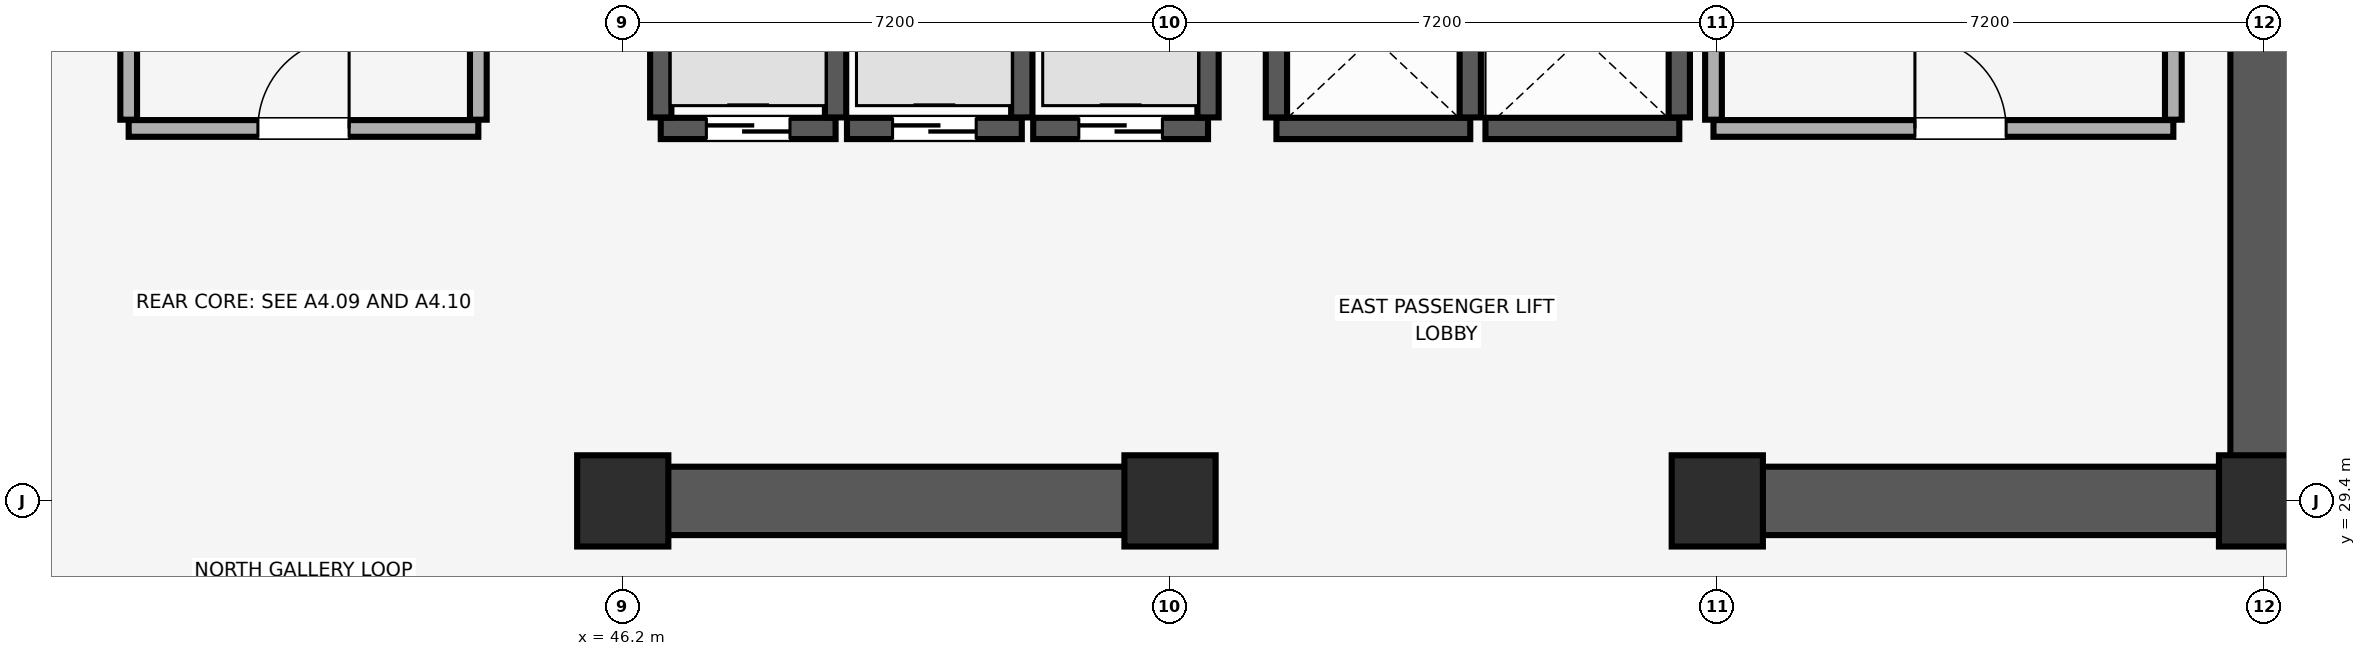
"""IFC4 building model, lengths in metres.
Left out: names, types, materials, properties, quantities, classifications, styles, units other than length and angle.
Written with IfcOpenShell. Run it as: python <this file> out.ifc"""

import sys

from ifc_helpers import new_model, si_unit, direction, frame, frame_2d, origin, origin_2d, place, context, subcontext, project, spatial, rectangle, extrude, element, fill, save


model = new_model("IFC4")
c1 = context("Model", 3, precision=1e-05, world=origin(), true_north=direction((0.0, 1.0)))
c2 = subcontext(c1, "Body", "Model", "MODEL_VIEW")
j1 = project(units=[si_unit("LENGTHUNIT", "METRE"), si_unit("PLANEANGLEUNIT", "RADIAN")], contexts=[c1])
p1 = place(None, origin())
s1 = spatial("IfcSite", under=j1, at=p1, CompositionType="ELEMENT")
p2 = place(p1, origin())
s2 = spatial("IfcBuilding", under=s1, at=p2, CompositionType="ELEMENT")
p3 = place(p2, frame((0.0, 0.0, 180.95)))
s3 = spatial("IfcBuildingStorey", under=s2, at=p3, CompositionType="ELEMENT", Elevation=180.95)
for number, where, z_axis, x_axis in (
    (1, (46.2, 29.4, 0.0), (0.0, 0.0, 1.0), (1.0, 0.0, 0.0)),
    (2, (53.4, 29.4, 0.0), (0.0, 0.0, 1.0), (1.0, 0.0, 0.0)),
    (3, (60.6, 29.4, 0.0), (0.0, 0.0, 1.0), (1.0, 0.0, 0.0)),
    (4, (67.8, 29.4, 0.0), (0.0, 0.0, 1.0), (1.0, 0.0, 0.0)),
):
    element("IfcColumn", number, at=place(p3, frame(where, z_axis=z_axis, x_axis=x_axis)), inside=s3, PredefinedType="COLUMN", context=c2, shape_type="SweptSolid", body=[
        extrude(rectangle(XDim=1.2, YDim=1.2, at=origin_2d()), origin(), (0.0, 0.0, 1.0), 3.45),
    ])
p4 = place(p3, frame((67.8, 29.4, 0.0), z_axis=(0.0, 0.0, 1.0), x_axis=(0.0, 1.0, 0.0)))
e5 = element("IfcWall", 5, at=p4, inside=s3, PredefinedType="SHEAR", context=c2, shape_type="SweptSolid", body=[
    extrude(rectangle(XDim=19.2, YDim=0.9, at=frame_2d((9.6, 0.0))), origin(), (0.0, 0.0, 1.0), 3.45),
])
p5 = place(p3, frame((46.0, 29.4, 0.0), z_axis=(0.0, 0.0, 1.0), x_axis=(1.0, 0.0, 0.0)))
e6 = element("IfcWall", 6, at=p5, inside=s3, PredefinedType="SHEAR", context=c2, shape_type="SweptSolid", body=[
    extrude(rectangle(XDim=7.6, YDim=0.9, at=frame_2d((3.8, 0.0))), origin(), (0.0, 0.0, 1.0), 3.45),
])
p6 = place(p3, frame((60.4, 29.4, 0.0), z_axis=(0.0, 0.0, 1.0), x_axis=(1.0, 0.0, 0.0)))
e7 = element("IfcWall", 7, at=p6, inside=s3, PredefinedType="SHEAR", context=c2, shape_type="SweptSolid", body=[
    extrude(rectangle(XDim=6.945, YDim=0.9, at=frame_2d((3.473, 0.0))), origin(), (0.0, 0.0, 1.0), 3.45),
])
p7 = place(p3, frame((46.7, 34.3, 0.0), z_axis=(0.0, 0.0, 1.0), x_axis=(1.0, 0.0, 0.0)))
e8 = element("IfcWall", 8, at=p7, inside=s3, PredefinedType="SHEAR", context=c2, shape_type="SweptSolid", body=[
    extrude(rectangle(XDim=2.3, YDim=0.28, at=frame_2d((1.15, 0.0))), origin(), (0.0, 0.0, 1.0), 3.45),
])
p8 = place(p7, frame((0.6, 0.0, 0.0)))
e9 = element("IfcOpeningElement", 9, at=p8, cuts=e8, PredefinedType="OPENING", context=c2, shape_type="SweptSolid", body=[
    extrude(rectangle(XDim=1.1, YDim=2.2, at=frame_2d((0.55, 1.1))), frame((0.0, 0.15, 0.0), z_axis=(0.0, -1.0, 0.0), x_axis=(1.0, 0.0, 0.0)), (0.0, 0.0, 1.0), 0.3),
])
for number, where, z_axis, x_axis in (
    (10, (46.7, 34.445, 0.0), (0.0, 0.0, 1.0), (0.0, 1.0, 0.0)),
    (11, (49.0, 34.445, 0.0), (0.0, 0.0, 1.0), (0.0, 1.0, 0.0)),
):
    element("IfcWall", number, at=place(p3, frame(where, z_axis=z_axis, x_axis=x_axis)), inside=s3, PredefinedType="SHEAR", context=c2, shape_type="SweptSolid", body=[
        extrude(rectangle(XDim=2.01, YDim=0.28, at=frame_2d((1.005, 0.0))), origin(), (0.0, 0.0, 1.0), 3.45),
    ])
p9 = place(p3, frame((49.15, 34.3, 0.0), z_axis=(0.0, 0.0, 1.0), x_axis=(1.0, 0.0, 0.0)))
e12 = element("IfcWall", 12, at=p9, inside=s3, PredefinedType="SHEAR", context=c2, shape_type="SweptSolid", body=[
    extrude(rectangle(XDim=2.3, YDim=0.28, at=frame_2d((1.15, 0.0))), origin(), (0.0, 0.0, 1.0), 3.45),
])
p10 = place(p9, frame((0.6, 0.0, 0.0)))
e13 = element("IfcOpeningElement", 13, at=p10, cuts=e12, PredefinedType="OPENING", context=c2, shape_type="SweptSolid", body=[
    extrude(rectangle(XDim=1.1, YDim=2.2, at=frame_2d((0.55, 1.1))), frame((0.0, 0.15, 0.0), z_axis=(0.0, -1.0, 0.0), x_axis=(1.0, 0.0, 0.0)), (0.0, 0.0, 1.0), 0.3),
])
p11 = place(p3, frame((51.45, 34.445, 0.0), z_axis=(0.0, 0.0, 1.0), x_axis=(0.0, 1.0, 0.0)))
e14 = element("IfcWall", 14, at=p11, inside=s3, PredefinedType="SHEAR", context=c2, shape_type="SweptSolid", body=[
    extrude(rectangle(XDim=2.01, YDim=0.28, at=frame_2d((1.005, 0.0))), origin(), (0.0, 0.0, 1.0), 3.45),
])
p12 = place(p3, frame((51.6, 34.3, 0.0), z_axis=(0.0, 0.0, 1.0), x_axis=(1.0, 0.0, 0.0)))
e15 = element("IfcWall", 15, at=p12, inside=s3, PredefinedType="SHEAR", context=c2, shape_type="SweptSolid", body=[
    extrude(rectangle(XDim=2.3, YDim=0.28, at=frame_2d((1.15, 0.0))), origin(), (0.0, 0.0, 1.0), 3.45),
])
p13 = place(p12, frame((0.6, 0.0, 0.0)))
e16 = element("IfcOpeningElement", 16, at=p13, cuts=e15, PredefinedType="OPENING", context=c2, shape_type="SweptSolid", body=[
    extrude(rectangle(XDim=1.1, YDim=2.2, at=frame_2d((0.55, 1.1))), frame((0.0, 0.15, 0.0), z_axis=(0.0, -1.0, 0.0), x_axis=(1.0, 0.0, 0.0)), (0.0, 0.0, 1.0), 0.3),
])
p14 = place(p3, frame((53.9, 34.445, 0.0), z_axis=(0.0, 0.0, 1.0), x_axis=(0.0, 1.0, 0.0)))
e17 = element("IfcWall", 17, at=p14, inside=s3, PredefinedType="SHEAR", context=c2, shape_type="SweptSolid", body=[
    extrude(rectangle(XDim=2.01, YDim=0.28, at=frame_2d((1.005, 0.0))), origin(), (0.0, 0.0, 1.0), 3.45),
])
p15 = place(p3, frame((54.8, 34.3, 0.0), z_axis=(0.0, 0.0, 1.0), x_axis=(1.0, 0.0, 0.0)))
e18 = element("IfcWall", 18, at=p15, inside=s3, PredefinedType="SHEAR", context=c2, shape_type="SweptSolid", body=[
    extrude(rectangle(XDim=2.55, YDim=0.28, at=frame_2d((1.275, 0.0))), origin(), (0.0, 0.0, 1.0), 3.45),
])
for number, where, z_axis, x_axis in (
    (19, (54.8, 34.445, 0.0), (0.0, 0.0, 1.0), (0.0, 1.0, 0.0)),
    (20, (57.35, 34.445, 0.0), (0.0, 0.0, 1.0), (0.0, 1.0, 0.0)),
):
    element("IfcWall", number, at=place(p3, frame(where, z_axis=z_axis, x_axis=x_axis)), inside=s3, PredefinedType="SHEAR", context=c2, shape_type="SweptSolid", body=[
        extrude(rectangle(XDim=2.11, YDim=0.28, at=frame_2d((1.055, 0.0))), origin(), (0.0, 0.0, 1.0), 3.45),
    ])
p16 = place(p3, frame((57.55, 34.3, 0.0), z_axis=(0.0, 0.0, 1.0), x_axis=(1.0, 0.0, 0.0)))
e21 = element("IfcWall", 21, at=p16, inside=s3, PredefinedType="SHEAR", context=c2, shape_type="SweptSolid", body=[
    extrude(rectangle(XDim=2.55, YDim=0.28, at=frame_2d((1.275, 0.0))), origin(), (0.0, 0.0, 1.0), 3.45),
])
p17 = place(p3, frame((60.1, 34.445, 0.0), z_axis=(0.0, 0.0, 1.0), x_axis=(0.0, 1.0, 0.0)))
e22 = element("IfcWall", 22, at=p17, inside=s3, PredefinedType="SHEAR", context=c2, shape_type="SweptSolid", body=[
    extrude(rectangle(XDim=2.11, YDim=0.28, at=frame_2d((1.055, 0.0))), origin(), (0.0, 0.0, 1.0), 3.45),
])
p18 = place(p3, frame((60.55, 34.3, 0.0), z_axis=(0.0, 0.0, 1.0), x_axis=(1.0, 0.0, 0.0)))
e23 = element("IfcWall", 23, at=p18, inside=s3, PredefinedType="PARTITIONING", context=c2, shape_type="SweptSolid", body=[
    extrude(rectangle(XDim=6.05, YDim=0.22, at=frame_2d((3.025, 0.0))), origin(), (0.0, 0.0, 1.0), 3.45),
])
p19 = place(p18, frame((2.65, 0.0, 0.0)))
e24 = element("IfcOpeningElement", 24, at=p19, cuts=e23, PredefinedType="OPENING", context=c2, shape_type="SweptSolid", body=[
    extrude(rectangle(XDim=1.2, YDim=2.15, at=frame_2d((0.6, 1.075))), frame((0.0, 0.12, 0.0), z_axis=(0.0, -1.0, 0.0), x_axis=(1.0, 0.0, 0.0)), (0.0, 0.0, 1.0), 0.24),
])
p20 = place(p3, frame((60.55, 34.415, 0.0), z_axis=(0.0, 0.0, 1.0), x_axis=(0.0, 1.0, 0.0)))
e25 = element("IfcWall", 25, at=p20, inside=s3, PredefinedType="PARTITIONING", context=c2, shape_type="SweptSolid", body=[
    extrude(rectangle(XDim=5.64, YDim=0.22, at=frame_2d((2.82, 0.0))), origin(), (0.0, 0.0, 1.0), 3.45),
])
p21 = place(p3, frame((66.6, 34.415, 0.0), z_axis=(0.0, 0.0, 1.0), x_axis=(0.0, 1.0, 0.0)))
e26 = element("IfcWall", 26, at=p21, inside=s3, PredefinedType="PARTITIONING", context=c2, shape_type="SweptSolid", body=[
    extrude(rectangle(XDim=5.43, YDim=0.22, at=frame_2d((2.715, 0.0))), origin(), (0.0, 0.0, 1.0), 3.45),
])
p22 = place(p3, frame((39.7, 34.3, 0.0), z_axis=(0.0, 0.0, 1.0), x_axis=(1.0, 0.0, 0.0)))
e27 = element("IfcWall", 27, at=p22, inside=s3, PredefinedType="PARTITIONING", context=c2, shape_type="SweptSolid", body=[
    extrude(rectangle(XDim=4.6, YDim=0.22, at=frame_2d((2.3, 0.0))), origin(), (0.0, 0.0, 1.0), 3.45),
])
p23 = place(p22, frame((1.7, 0.0, 0.0)))
e28 = element("IfcOpeningElement", 28, at=p23, cuts=e27, PredefinedType="OPENING", context=c2, shape_type="SweptSolid", body=[
    extrude(rectangle(XDim=1.2, YDim=2.15, at=frame_2d((0.6, 1.075))), frame((0.0, 0.12, 0.0), z_axis=(0.0, -1.0, 0.0), x_axis=(1.0, 0.0, 0.0)), (0.0, 0.0, 1.0), 0.24),
])
for number, where, z_axis, x_axis in (
    (29, (39.7, 34.415, 0.0), (0.0, 0.0, 1.0), (0.0, 1.0, 0.0)),
    (30, (44.3, 34.415, 0.0), (0.0, 0.0, 1.0), (0.0, 1.0, 0.0)),
):
    element("IfcWall", number, at=place(p3, frame(where, z_axis=z_axis, x_axis=x_axis)), inside=s3, PredefinedType="PARTITIONING", context=c2, shape_type="SweptSolid", body=[
        extrude(rectangle(XDim=5.785, YDim=0.22, at=frame_2d((2.893, 0.0))), origin(), (0.0, 0.0, 1.0), 3.45),
    ])
p24 = place(p8, origin())
e31 = element("IfcDoor", 31, at=p24, inside=s3, OperationType="DOUBLE_DOOR_SLIDING", PredefinedType="DOOR", context=c2, shape_type="SweptSolid", body=[
    extrude(rectangle(XDim=1.1, YDim=2.2, at=frame_2d((0.55, 1.1))), frame((0.0, 0.025, 0.0), z_axis=(0.0, -1.0, 0.0), x_axis=(1.0, 0.0, 0.0)), (0.0, 0.0, 1.0), 0.05),
])
fill(e9, e31)
p25 = place(p10, origin())
e32 = element("IfcDoor", 32, at=p25, inside=s3, OperationType="DOUBLE_DOOR_SLIDING", PredefinedType="DOOR", context=c2, shape_type="SweptSolid", body=[
    extrude(rectangle(XDim=1.1, YDim=2.2, at=frame_2d((0.55, 1.1))), frame((0.0, 0.025, 0.0), z_axis=(0.0, -1.0, 0.0), x_axis=(1.0, 0.0, 0.0)), (0.0, 0.0, 1.0), 0.05),
])
fill(e13, e32)
p26 = place(p13, origin())
e33 = element("IfcDoor", 33, at=p26, inside=s3, OperationType="DOUBLE_DOOR_SLIDING", PredefinedType="DOOR", context=c2, shape_type="SweptSolid", body=[
    extrude(rectangle(XDim=1.1, YDim=2.2, at=frame_2d((0.55, 1.1))), frame((0.0, 0.025, 0.0), z_axis=(0.0, -1.0, 0.0), x_axis=(1.0, 0.0, 0.0)), (0.0, 0.0, 1.0), 0.05),
])
fill(e16, e33)
p27 = place(p19, origin())
e34 = element("IfcDoor", 34, at=p27, inside=s3, OperationType="SINGLE_SWING_LEFT", PredefinedType="DOOR", context=c2, shape_type="SweptSolid", body=[
    extrude(rectangle(XDim=1.2, YDim=2.15, at=frame_2d((0.6, 1.075))), frame((0.0, 0.025, 0.0), z_axis=(0.0, -1.0, 0.0), x_axis=(1.0, 0.0, 0.0)), (0.0, 0.0, 1.0), 0.05),
])
fill(e24, e34)
p28 = place(p23, origin())
e35 = element("IfcDoor", 35, at=p28, inside=s3, OperationType="SINGLE_SWING_RIGHT", PredefinedType="DOOR", context=c2, shape_type="SweptSolid", body=[
    extrude(rectangle(XDim=1.2, YDim=2.15, at=frame_2d((0.6, 1.075))), frame((0.0, 0.025, 0.0), z_axis=(0.0, -1.0, 0.0), x_axis=(1.0, 0.0, 0.0)), (0.0, 0.0, 1.0), 0.05),
])
fill(e28, e35)
save(model, sys.argv[1])
